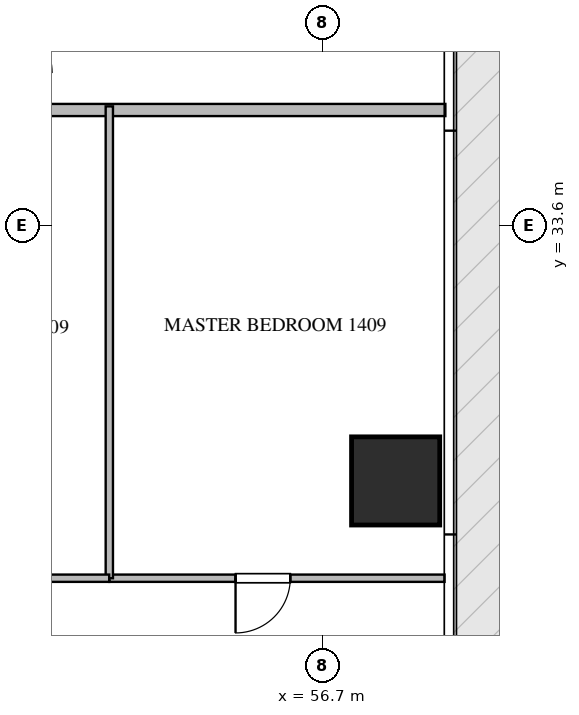
"""IFC4 building model, lengths in metres.
Left out: names, types, materials, properties, quantities, classifications, styles, units other than length and angle.
Written with IfcOpenShell. Run it as: python <this file> out.ifc"""

import sys

from ifc_helpers import new_model, si_unit, direction, frame, frame_2d, origin, origin_2d, place, context, subcontext, project, spatial, rectangle, extrude, source, transform, mapped, element, fill, save


model = new_model("IFC4")
c1 = context("Model", 3, precision=1e-05, world=origin(), true_north=direction((0.0, 1.0)))
c2 = subcontext(c1, "Body", "Model", "MODEL_VIEW")
j1 = project(units=[si_unit("LENGTHUNIT", "METRE"), si_unit("PLANEANGLEUNIT", "RADIAN")], contexts=[c1])
p1 = place(None, origin())
s1 = spatial("IfcSite", under=j1, at=p1, CompositionType="ELEMENT")
p2 = place(p1, origin())
s2 = spatial("IfcBuilding", under=s1, at=p2, CompositionType="ELEMENT")
p3 = place(p2, frame((0.0, 0.0, 60.45)))
s3 = spatial("IfcBuildingStorey", under=s2, at=p3, CompositionType="ELEMENT", Elevation=60.45)
m1 = source(origin(), c2, "Body", "SweptSolid", [
    extrude(rectangle(XDim=1.45, YDim=1.45, at=origin_2d()), origin(), (0.0, 0.0, 1.0), 3.75),
])
p4 = place(p3, frame((57.9, 29.4, -0.26), z_axis=(0.0, 0.0, 1.0), x_axis=(1.0, 0.0, 0.0)))
e1 = element("IfcColumn", 1, at=p4, inside=s3, PredefinedType="COLUMN", context=c2, shape_type="MappedRepresentation", body=[
    mapped(m1, transform((0.0, 0.0, 0.0), scale=1.0)),
])
p5 = place(p3, frame((43.4, 35.5, 0.0), z_axis=(0.0, 0.0, 1.0), x_axis=(1.0, 0.0, 0.0)))
e2 = element("IfcWall", 2, at=p5, inside=s3, PredefinedType="PARTITIONING", context=c2, shape_type="SweptSolid", body=[
    extrude(rectangle(XDim=15.318, YDim=0.2, at=frame_2d((7.659, 0.0))), origin(), (0.0, 0.0, 1.0), 3.49),
])
p6 = place(p3, frame((58.705, 27.8, 0.0), z_axis=(0.0, 0.0, 1.0), x_axis=(-1.0, 0.0, 0.0)))
e3 = element("IfcWall", 3, at=p6, inside=s3, PredefinedType="PARTITIONING", context=c2, shape_type="SweptSolid", body=[
    extrude(rectangle(XDim=5.514, YDim=0.12, at=frame_2d((2.757, 0.0))), origin(), (0.0, 0.0, 1.0), 3.49),
])
p7 = place(p6, frame((2.538, 0.0, 0.0)))
e4 = element("IfcOpeningElement", 4, at=p7, cuts=e3, PredefinedType="OPENING", context=c2, shape_type="SweptSolid", body=[
    extrude(rectangle(XDim=0.9, YDim=2.1, at=frame_2d((0.45, 1.05))), frame((0.0, 0.07, 0.0), z_axis=(0.0, -1.0, 0.0), x_axis=(1.0, 0.0, 0.0)), (0.0, 0.0, 1.0), 0.14),
])
p8 = place(p3, frame((53.191, 27.8, 0.0), z_axis=(0.0, 0.0, 1.0), x_axis=(0.0, 1.0, 0.0)))
e5 = element("IfcWall", 5, at=p8, inside=s3, PredefinedType="PARTITIONING", context=c2, shape_type="SweptSolid", body=[
    extrude(rectangle(XDim=7.76, YDim=0.12, at=frame_2d((3.88, 0.0))), origin(), (0.0, 0.0, 1.0), 3.49),
])
p9 = place(p3, frame((53.189, 27.8, 0.0), z_axis=(0.0, 0.0, 1.0), x_axis=(-1.0, 0.0, 0.0)))
e6 = element("IfcWall", 6, at=p9, inside=s3, PredefinedType="PARTITIONING", context=c2, shape_type="SweptSolid", body=[
    extrude(rectangle(XDim=5.596, YDim=0.12, at=frame_2d((2.798, 0.0))), origin(), (0.0, 0.0, 1.0), 3.49),
])
p10 = place(p9, frame((2.373, 0.0, 0.0)))
e7 = element("IfcOpeningElement", 7, at=p10, cuts=e6, PredefinedType="OPENING", context=c2, shape_type="SweptSolid", body=[
    extrude(rectangle(XDim=0.85, YDim=2.1, at=frame_2d((0.425, 1.05))), frame((0.0, 0.07, 0.0), z_axis=(0.0, -1.0, 0.0), x_axis=(1.0, 0.0, 0.0)), (0.0, 0.0, 1.0), 0.14),
])
m2 = source(origin(), c2, "Body", "SweptSolid", [
    extrude(rectangle(XDim=0.9, YDim=2.1, at=frame_2d((0.45, 1.05))), frame((0.0, 0.025, 0.0), z_axis=(0.0, -1.0, 0.0), x_axis=(1.0, 0.0, 0.0)), (0.0, 0.0, 1.0), 0.05),
])
p11 = place(p7, origin())
e8 = element("IfcDoor", 8, at=p11, inside=s3, OperationType="SINGLE_SWING_RIGHT", PredefinedType="DOOR", context=c2, shape_type="MappedRepresentation", body=[
    mapped(m2, transform((0.0, 0.0, 0.0), scale=1.0)),
])
fill(e4, e8)
save(model, sys.argv[1])
